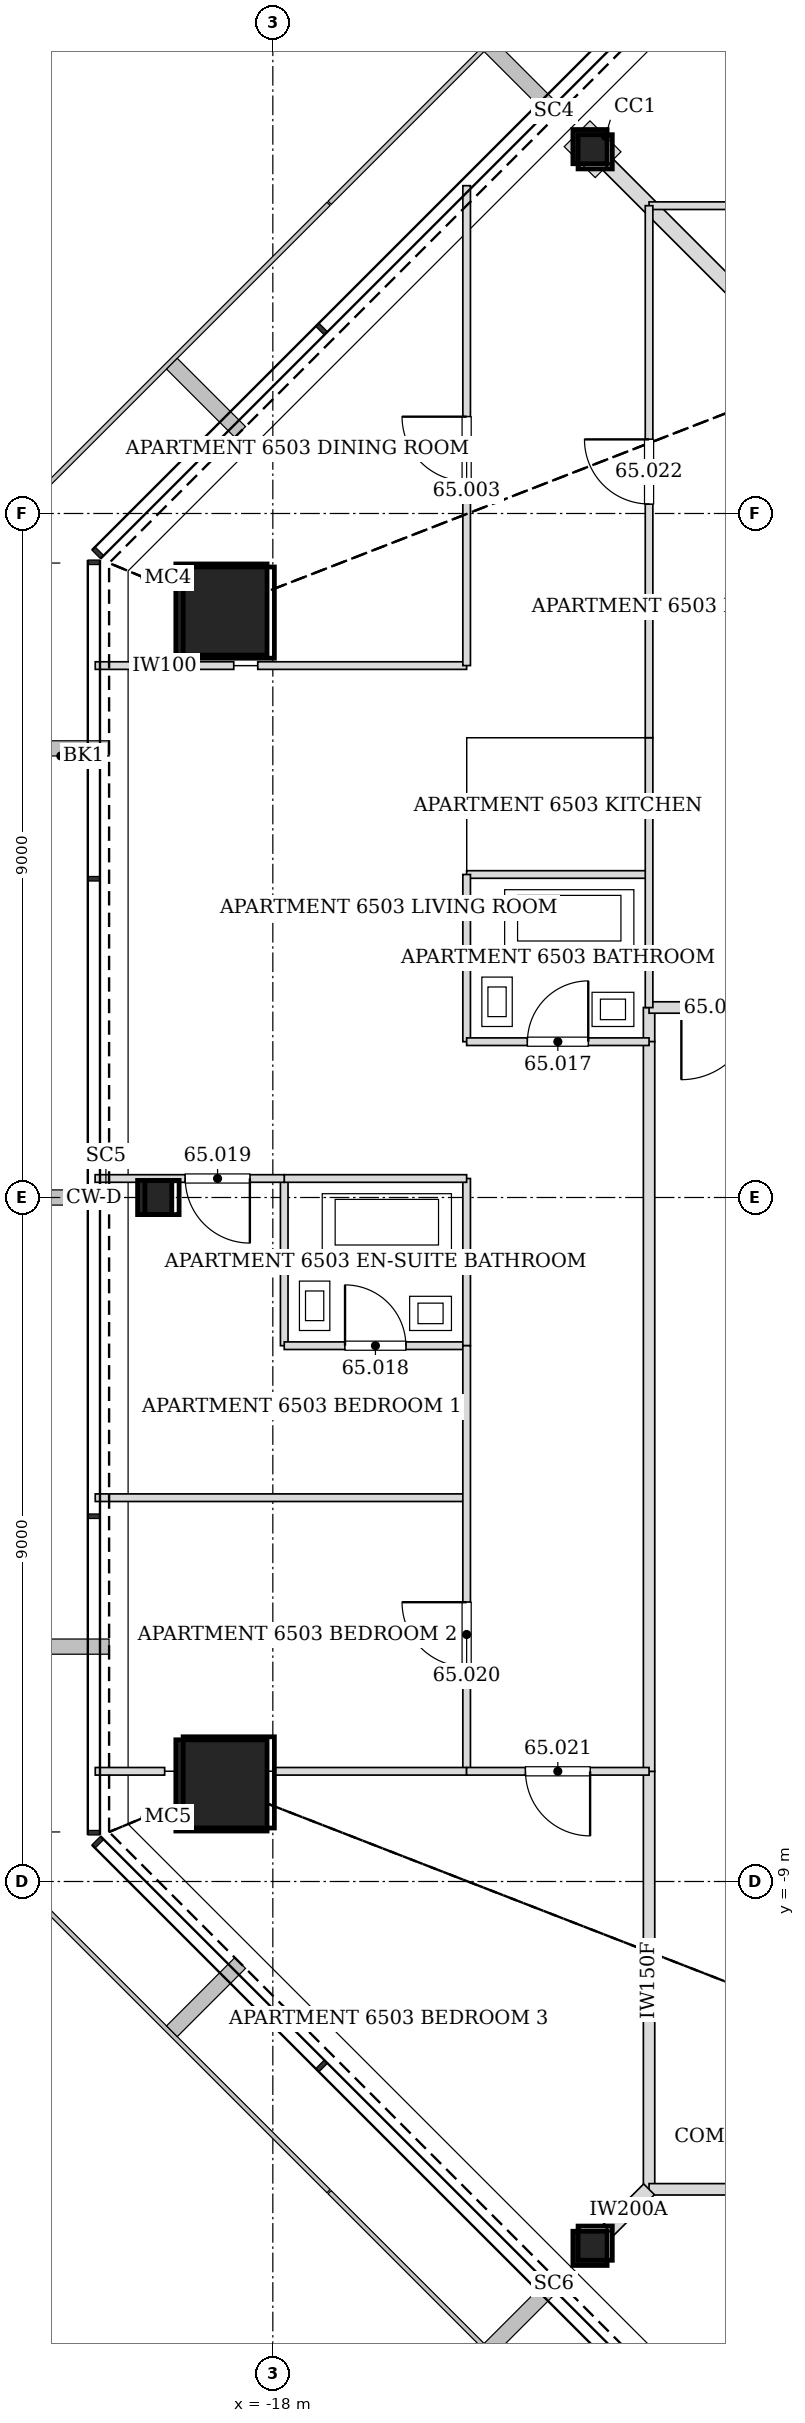
"""IFC4 building model, lengths in metres.
Left out: names, types, materials, properties, quantities, classifications, styles, units other than length and angle.
Written with IfcOpenShell. Run it as: python <this file> out.ifc"""

import sys

from ifc_helpers import new_model, si_unit, direction, frame, frame_2d, origin, origin_2d, place, context, subcontext, project, spatial, rectangle, hollow_rectangle, extrude, element, fill, save


model = new_model("IFC4")
c1 = context("Model", 3, precision=1e-05, world=origin(), true_north=direction((0.0, 1.0)))
c2 = subcontext(c1, "Body", "Model", "MODEL_VIEW")
j1 = project(units=[si_unit("LENGTHUNIT", "METRE"), si_unit("PLANEANGLEUNIT", "RADIAN")], contexts=[c1])
p1 = place(None, origin())
s1 = spatial("IfcSite", under=j1, at=p1, CompositionType="ELEMENT")
p2 = place(p1, origin())
s2 = spatial("IfcBuilding", under=s1, at=p2, CompositionType="ELEMENT")
p3 = place(p2, frame((0.0, 0.0, 270.8)))
s3 = spatial("IfcBuildingStorey", under=s2, at=p3, CompositionType="ELEMENT", Elevation=270.8)
for number, where, z_axis, x_axis in (
    (1, (-18.676, 7.736, 0.0), (0.028, -0.012, 1.0), (0.382, 0.924, 0.0)),
    (2, (-18.676, -7.736, 0.0), (0.028, 0.012, 1.0), (-0.382, 0.924, 0.0)),
):
    element("IfcColumn", number, at=place(p3, frame(where, z_axis=z_axis, x_axis=x_axis)), inside=s3, PredefinedType="COLUMN", context=c2, shape_type="SweptSolid", body=[
        extrude(hollow_rectangle(XDim=1.2, YDim=1.2, WallThickness=0.055, at=origin_2d()), origin(), (0.0, 0.0, 1.0), 3.402),
    ])
for number, where, z_axis, x_axis in (
    (3, (-13.827, 13.827, 0.0), (0.02, -0.02, 1.0), (0.707, 0.707, 0.0)),
    (4, (-19.554, 0.0, 0.0), (0.028, 0.0, 1.0), (0.0, 1.0, 0.0)),
    (5, (-13.827, -13.827, 0.0), (0.02, 0.02, 1.0), (-0.707, 0.707, 0.0)),
):
    element("IfcColumn", number, at=place(p3, frame(where, z_axis=z_axis, x_axis=x_axis)), inside=s3, PredefinedType="COLUMN", context=c2, shape_type="SweptSolid", body=[
        extrude(hollow_rectangle(XDim=0.45, YDim=0.45, WallThickness=0.02, at=origin_2d()), origin(), (0.0, 0.0, 1.0), 3.401),
    ])
p4 = place(p3, frame((-13.05, 2.5, 0.0), z_axis=(0.0, 0.0, 1.0), x_axis=(0.0, -1.0, 0.0)))
e6 = element("IfcWall", 6, at=p4, inside=s3, PredefinedType="PARTITIONING", context=c2, shape_type="SweptSolid", body=[
    extrude(rectangle(XDim=0.451, YDim=0.15, at=frame_2d((0.226, 0.0))), origin(), (0.0, 0.0, 1.0), 3.2),
])
p5 = place(p3, frame((-13.05, -7.549, 0.0), z_axis=(0.0, 0.0, 1.0), x_axis=(0.0, -1.0, 0.0)))
e7 = element("IfcWall", 7, at=p5, inside=s3, PredefinedType="PARTITIONING", context=c2, shape_type="SweptSolid", body=[
    extrude(rectangle(XDim=5.501, YDim=0.15, at=frame_2d((2.75, 0.0))), origin(), (0.0, 0.0, 1.0), 2.349),
])
p6 = place(p3, frame((-13.05, 2.051, 0.0), z_axis=(0.0, 0.0, 1.0), x_axis=(0.0, -1.0, 0.0)))
e8 = element("IfcWall", 8, at=p6, inside=s3, PredefinedType="PARTITIONING", context=c2, shape_type="SweptSolid", body=[
    extrude(rectangle(XDim=9.602, YDim=0.15, at=frame_2d((4.801, 0.0))), origin(), (0.0, 0.0, 1.0), 2.344),
])
p7 = place(p3, frame((-13.05, -13.05, 0.0), z_axis=(0.0, 0.0, 1.0), x_axis=(1.0, 0.0, 0.0)))
e9 = element("IfcWall", 9, at=p7, inside=s3, PredefinedType="PARTITIONING", context=c2, shape_type="SweptSolid", body=[
    extrude(rectangle(XDim=5.501, YDim=0.15, at=frame_2d((2.75, 0.0))), origin(), (0.0, 0.0, 1.0), 2.349),
])
p8 = place(p3, frame((-11.25, 2.5, 0.0), z_axis=(0.0, 0.0, 1.0), x_axis=(-1.0, 0.0, 0.0)))
e10 = element("IfcWall", 10, at=p8, inside=s3, PredefinedType="PARTITIONING", context=c2, shape_type="SweptSolid", body=[
    extrude(rectangle(XDim=1.8, YDim=0.15, at=frame_2d((0.9, 0.0))), origin(), (0.0, 0.0, 1.0), 3.2),
])
p9 = place(p8, frame((0.425, 0.0, 0.0)))
e11 = element("IfcOpeningElement", 11, at=p9, cuts=e10, PredefinedType="OPENING", context=c2, shape_type="SweptSolid", body=[
    extrude(rectangle(XDim=0.95, YDim=2.1, at=frame_2d((0.475, 1.05))), frame((0.0, 0.085, 0.0), z_axis=(0.0, -1.0, 0.0), x_axis=(1.0, 0.0, 0.0)), (0.0, 0.0, 1.0), 0.17),
])
p10 = place(p3, frame((-20.336, 6.999, 0.0), z_axis=(0.0, 0.0, 1.0), x_axis=(1.0, 0.0, 0.0)))
e12 = element("IfcWall", 12, at=p10, inside=s3, PredefinedType="PARTITIONING", context=c2, shape_type="SweptSolid", body=[
    extrude(rectangle(XDim=1.822, YDim=0.1, at=frame_2d((0.911, 0.0))), origin(), (0.0, 0.0, 1.0), 2.74),
])
p11 = place(p3, frame((-18.198, 6.999, 0.0), z_axis=(0.0, 0.0, 1.0), x_axis=(1.0, 0.0, 0.0)))
e13 = element("IfcWall", 13, at=p11, inside=s3, PredefinedType="PARTITIONING", context=c2, shape_type="SweptSolid", body=[
    extrude(rectangle(XDim=2.748, YDim=0.1, at=frame_2d((1.374, 0.0))), origin(), (0.0, 0.0, 1.0), 2.591),
])
p12 = place(p3, frame((-15.45, 6.999, 0.0), z_axis=(0.0, 0.0, 1.0), x_axis=(0.0, 1.0, 0.0)))
e14 = element("IfcWall", 14, at=p12, inside=s3, PredefinedType="PARTITIONING", context=c2, shape_type="SweptSolid", body=[
    extrude(rectangle(XDim=6.314, YDim=0.1, at=frame_2d((3.157, 0.0))), origin(), (0.0, 0.0, 1.0), 2.349),
])
p13 = place(p12, frame((2.425, 0.0, 0.0)))
e15 = element("IfcOpeningElement", 15, at=p13, cuts=e14, PredefinedType="OPENING", context=c2, shape_type="SweptSolid", body=[
    extrude(rectangle(XDim=0.85, YDim=2.1, at=frame_2d((0.425, 1.05))), frame((0.0, 0.06, 0.0), z_axis=(0.0, -1.0, 0.0), x_axis=(1.0, 0.0, 0.0)), (0.0, 0.0, 1.0), 0.12),
])
p14 = place(p3, frame((-13.586, 13.586, 0.0), z_axis=(0.0, 0.0, 1.0), x_axis=(0.707106781187, -0.707106781187, 0.0)))
e16 = element("IfcWall", 16, at=p14, inside=s3, PredefinedType="PARTITIONING", context=c2, shape_type="SweptSolid", body=[
    extrude(rectangle(XDim=3.277, YDim=0.2, at=frame_2d((1.638, 0.0))), origin(), (0.0, 0.0, 1.0), 2.591),
])
p15 = place(p3, frame((-13.05, 13.05, 0.0), z_axis=(0.0, 0.0, 1.0), x_axis=(1.0, 0.0, 0.0)))
e17 = element("IfcWall", 17, at=p15, inside=s3, PredefinedType="PARTITIONING", context=c2, shape_type="SweptSolid", body=[
    extrude(rectangle(XDim=7.0, YDim=0.1, at=frame_2d((3.5, 0.0))), origin(), (0.0, 0.0, 1.0), 2.349),
])
p16 = place(p15, frame((3.075, 0.0, 0.0)))
e18 = element("IfcOpeningElement", 18, at=p16, cuts=e17, PredefinedType="OPENING", context=c2, shape_type="SweptSolid", body=[
    extrude(rectangle(XDim=0.85, YDim=2.1, at=frame_2d((0.425, 1.05))), frame((0.0, 0.06, 0.0), z_axis=(0.0, -1.0, 0.0), x_axis=(1.0, 0.0, 0.0)), (0.0, 0.0, 1.0), 0.12),
])
p17 = place(p3, frame((-15.45, 4.25, 0.0), z_axis=(0.0, 0.0, 1.0), x_axis=(1.0, 0.0, 0.0)))
e19 = element("IfcWall", 19, at=p17, inside=s3, PredefinedType="PARTITIONING", context=c2, shape_type="SweptSolid", body=[
    extrude(rectangle(XDim=2.4, YDim=0.1, at=frame_2d((1.2, 0.0))), origin(), (0.0, 0.0, 1.0), 2.591),
])
p18 = place(p3, frame((-13.05, 6.05, 0.0), z_axis=(0.0, 0.0, 1.0), x_axis=(0.0, -1.0, 0.0)))
e20 = element("IfcWall", 20, at=p18, inside=s3, PredefinedType="PARTITIONING", context=c2, shape_type="SweptSolid", body=[
    extrude(rectangle(XDim=3.551, YDim=0.1, at=frame_2d((1.775, 0.0))), origin(), (0.0, 0.0, 1.0), 3.2),
])
p19 = place(p3, frame((-15.45, 4.25, 0.0), z_axis=(0.0, 0.0, 1.0), x_axis=(0.0, -1.0, 0.0)))
e21 = element("IfcWall", 21, at=p19, inside=s3, PredefinedType="PARTITIONING", context=c2, shape_type="SweptSolid", body=[
    extrude(rectangle(XDim=2.2, YDim=0.1, at=frame_2d((1.1, 0.0))), origin(), (0.0, 0.0, 1.0), 3.2),
])
p20 = place(p3, frame((-15.45, 2.05, 0.0), z_axis=(0.0, 0.0, 1.0), x_axis=(1.0, 0.0, 0.0)))
e22 = element("IfcWall", 22, at=p20, inside=s3, PredefinedType="PARTITIONING", context=c2, shape_type="SweptSolid", body=[
    extrude(rectangle(XDim=2.4, YDim=0.1, at=frame_2d((1.2, 0.0))), origin(), (0.0, 0.0, 1.0), 2.591),
])
p21 = place(p20, frame((0.8, 0.0, 0.0)))
e23 = element("IfcOpeningElement", 23, at=p21, cuts=e22, PredefinedType="OPENING", context=c2, shape_type="SweptSolid", body=[
    extrude(rectangle(XDim=0.8, YDim=2.1, at=frame_2d((0.4, 1.05))), frame((0.0, 0.06, 0.0), z_axis=(0.0, -1.0, 0.0), x_axis=(1.0, 0.0, 0.0)), (0.0, 0.0, 1.0), 0.12),
])
p22 = place(p3, frame((-17.85, 0.25, 0.0), z_axis=(0.0, 0.0, 1.0), x_axis=(0.0, -1.0, 0.0)))
e24 = element("IfcWall", 24, at=p22, inside=s3, PredefinedType="PARTITIONING", context=c2, shape_type="SweptSolid", body=[
    extrude(rectangle(XDim=2.2, YDim=0.1, at=frame_2d((1.1, 0.0))), origin(), (0.0, 0.0, 1.0), 2.344),
])
p23 = place(p3, frame((-17.85, -1.95, 0.0), z_axis=(0.0, 0.0, 1.0), x_axis=(1.0, 0.0, 0.0)))
e25 = element("IfcWall", 25, at=p23, inside=s3, PredefinedType="PARTITIONING", context=c2, shape_type="SweptSolid", body=[
    extrude(rectangle(XDim=2.4, YDim=0.1, at=frame_2d((1.2, 0.0))), origin(), (0.0, 0.0, 1.0), 2.591),
])
p24 = place(p23, frame((0.8, 0.0, 0.0)))
e26 = element("IfcOpeningElement", 26, at=p24, cuts=e25, PredefinedType="OPENING", context=c2, shape_type="SweptSolid", body=[
    extrude(rectangle(XDim=0.8, YDim=2.1, at=frame_2d((0.4, 1.05))), frame((0.0, 0.06, 0.0), z_axis=(0.0, -1.0, 0.0), x_axis=(1.0, 0.0, 0.0)), (0.0, 0.0, 1.0), 0.12),
])
p25 = place(p3, frame((-15.45, -1.95, 0.0), z_axis=(0.0, 0.0, 1.0), x_axis=(0.0, 1.0, 0.0)))
e27 = element("IfcWall", 27, at=p25, inside=s3, PredefinedType="PARTITIONING", context=c2, shape_type="SweptSolid", body=[
    extrude(rectangle(XDim=2.2, YDim=0.1, at=frame_2d((1.1, 0.0))), origin(), (0.0, 0.0, 1.0), 2.344),
])
p26 = place(p3, frame((-15.45, 0.25, 0.0), z_axis=(0.0, 0.0, 1.0), x_axis=(-1.0, 0.0, 0.0)))
e28 = element("IfcWall", 28, at=p26, inside=s3, PredefinedType="PARTITIONING", context=c2, shape_type="SweptSolid", body=[
    extrude(rectangle(XDim=2.4, YDim=0.1, at=frame_2d((1.2, 0.0))), origin(), (0.0, 0.0, 1.0), 2.591),
])
p27 = place(p3, frame((-20.336, -3.95, 0.0), z_axis=(0.0, 0.0, 1.0), x_axis=(1.0, 0.0, 0.0)))
e29 = element("IfcWall", 29, at=p27, inside=s3, PredefinedType="PARTITIONING", context=c2, shape_type="SweptSolid", body=[
    extrude(rectangle(XDim=4.886, YDim=0.1, at=frame_2d((2.443, 0.0))), origin(), (0.0, 0.0, 1.0), 2.591),
])
p28 = place(p3, frame((-17.85, 0.25, 0.0), z_axis=(0.0, 0.0, 1.0), x_axis=(-1.0, 0.0, 0.0)))
e30 = element("IfcWall", 30, at=p28, inside=s3, PredefinedType="PARTITIONING", context=c2, shape_type="SweptSolid", body=[
    extrude(rectangle(XDim=2.488, YDim=0.1, at=frame_2d((1.244, 0.0))), origin(), (0.0, 0.0, 1.0), 2.74),
])
p29 = place(p28, frame((0.452, 0.0, 0.0)))
e31 = element("IfcOpeningElement", 31, at=p29, cuts=e30, PredefinedType="OPENING", context=c2, shape_type="SweptSolid", body=[
    extrude(rectangle(XDim=0.85, YDim=2.1, at=frame_2d((0.425, 1.05))), frame((0.0, 0.06, 0.0), z_axis=(0.0, -1.0, 0.0), x_axis=(1.0, 0.0, 0.0)), (0.0, 0.0, 1.0), 0.12),
])
p30 = place(p3, frame((-15.45, -1.95, 0.0), z_axis=(0.0, 0.0, 1.0), x_axis=(0.0, -1.0, 0.0)))
e32 = element("IfcWall", 32, at=p30, inside=s3, PredefinedType="PARTITIONING", context=c2, shape_type="SweptSolid", body=[
    extrude(rectangle(XDim=5.6, YDim=0.1, at=frame_2d((2.8, 0.0))), origin(), (0.0, 0.0, 1.0), 3.2),
])
p31 = place(p30, frame((3.375, 0.0, 0.0)))
e33 = element("IfcOpeningElement", 33, at=p31, cuts=e32, PredefinedType="OPENING", context=c2, shape_type="SweptSolid", body=[
    extrude(rectangle(XDim=0.85, YDim=2.1, at=frame_2d((0.425, 1.05))), frame((0.0, 0.06, 0.0), z_axis=(0.0, -1.0, 0.0), x_axis=(1.0, 0.0, 0.0)), (0.0, 0.0, 1.0), 0.12),
])
p32 = place(p3, frame((-20.336, -7.55, 0.0), z_axis=(0.0, 0.0, 1.0), x_axis=(1.0, 0.0, 0.0)))
e34 = element("IfcWall", 34, at=p32, inside=s3, PredefinedType="PARTITIONING", context=c2, shape_type="SweptSolid", body=[
    extrude(rectangle(XDim=0.913, YDim=0.1, at=frame_2d((0.457, 0.0))), origin(), (0.0, 0.0, 1.0), 3.2),
])
p33 = place(p3, frame((-17.97, -7.55, 0.0), z_axis=(0.0, 0.0, 1.0), x_axis=(1.0, 0.0, 0.0)))
e35 = element("IfcWall", 35, at=p33, inside=s3, PredefinedType="PARTITIONING", context=c2, shape_type="SweptSolid", body=[
    extrude(rectangle(XDim=2.52, YDim=0.1, at=frame_2d((1.26, 0.0))), origin(), (0.0, 0.0, 1.0), 2.591),
])
p34 = place(p3, frame((-13.05, -7.55, 0.0), z_axis=(0.0, 0.0, 1.0), x_axis=(-1.0, 0.0, 0.0)))
e36 = element("IfcWall", 36, at=p34, inside=s3, PredefinedType="PARTITIONING", context=c2, shape_type="SweptSolid", body=[
    extrude(rectangle(XDim=2.401, YDim=0.1, at=frame_2d((1.2, 0.0))), origin(), (0.0, 0.0, 1.0), 2.591),
])
p35 = place(p34, frame((0.775, 0.0, 0.0)))
e37 = element("IfcOpeningElement", 37, at=p35, cuts=e36, PredefinedType="OPENING", context=c2, shape_type="SweptSolid", body=[
    extrude(rectangle(XDim=0.85, YDim=2.1, at=frame_2d((0.425, 1.05))), frame((0.0, 0.06, 0.0), z_axis=(0.0, -1.0, 0.0), x_axis=(1.0, 0.0, 0.0)), (0.0, 0.0, 1.0), 0.12),
])
p36 = place(p3, frame((-13.586, -13.586, 0.0), z_axis=(0.0, 0.0, 1.0), x_axis=(0.707106781187, 0.707106781187, 0.0)))
e38 = element("IfcWall", 38, at=p36, inside=s3, PredefinedType="PARTITIONING", context=c2, shape_type="SweptSolid", body=[
    extrude(rectangle(XDim=0.758, YDim=0.2, at=frame_2d((0.379, 0.0))), origin(), (0.0, 0.0, 1.0), 2.591),
])
p37 = place(p3, frame((-13.05, 6.05, 0.0), z_axis=(0.0, 0.0, 1.0), x_axis=(0.0, 1.0, 0.0)))
e39 = element("IfcWall", 39, at=p37, inside=s3, PredefinedType="PARTITIONING", context=c2, shape_type="SweptSolid", body=[
    extrude(rectangle(XDim=7.0, YDim=0.1, at=frame_2d((3.5, 0.0))), origin(), (0.0, 0.0, 1.0), 2.349),
])
p38 = place(p37, frame((3.075, 0.0, 0.0)))
e40 = element("IfcOpeningElement", 40, at=p38, cuts=e39, PredefinedType="OPENING", context=c2, shape_type="SweptSolid", body=[
    extrude(rectangle(XDim=0.85, YDim=2.1, at=frame_2d((0.425, 1.05))), frame((0.0, 0.06, 0.0), z_axis=(0.0, -1.0, 0.0), x_axis=(1.0, 0.0, 0.0)), (0.0, 0.0, 1.0), 0.12),
])
p39 = place(p13, origin())
e41 = element("IfcDoor", 41, at=p39, inside=s3, OperationType="SINGLE_SWING_RIGHT", PredefinedType="DOOR", context=c2, shape_type="SweptSolid", body=[
    extrude(rectangle(XDim=0.85, YDim=2.1, at=frame_2d((0.425, 1.05))), frame((0.0, 0.025, 0.0), z_axis=(0.0, -1.0, 0.0), x_axis=(1.0, 0.0, 0.0)), (0.0, 0.0, 1.0), 0.05),
])
fill(e15, e41)
p40 = place(p21, origin())
e42 = element("IfcDoor", 42, at=p40, inside=s3, OperationType="SINGLE_SWING_RIGHT", PredefinedType="DOOR", context=c2, shape_type="SweptSolid", body=[
    extrude(rectangle(XDim=0.8, YDim=2.1, at=frame_2d((0.4, 1.05))), frame((0.0, 0.025, 0.0), z_axis=(0.0, -1.0, 0.0), x_axis=(1.0, 0.0, 0.0)), (0.0, 0.0, 1.0), 0.05),
])
fill(e23, e42)
p41 = place(p24, origin())
e43 = element("IfcDoor", 43, at=p41, inside=s3, OperationType="SINGLE_SWING_LEFT", PredefinedType="DOOR", context=c2, shape_type="SweptSolid", body=[
    extrude(rectangle(XDim=0.8, YDim=2.1, at=frame_2d((0.4, 1.05))), frame((0.0, 0.025, 0.0), z_axis=(0.0, -1.0, 0.0), x_axis=(1.0, 0.0, 0.0)), (0.0, 0.0, 1.0), 0.05),
])
fill(e26, e43)
p42 = place(p29, origin())
e44 = element("IfcDoor", 44, at=p42, inside=s3, OperationType="SINGLE_SWING_LEFT", PredefinedType="DOOR", context=c2, shape_type="SweptSolid", body=[
    extrude(rectangle(XDim=0.85, YDim=2.1, at=frame_2d((0.425, 1.05))), frame((0.0, 0.025, 0.0), z_axis=(0.0, -1.0, 0.0), x_axis=(1.0, 0.0, 0.0)), (0.0, 0.0, 1.0), 0.05),
])
fill(e31, e44)
p43 = place(p31, frame((0.85, 0.0, 0.0), z_axis=(0.0, 0.0, 1.0), x_axis=(-1.0, 0.0, 0.0)))
e45 = element("IfcDoor", 45, at=p43, inside=s3, OperationType="SINGLE_SWING_RIGHT", PredefinedType="DOOR", context=c2, shape_type="SweptSolid", body=[
    extrude(rectangle(XDim=0.85, YDim=2.1, at=frame_2d((0.425, 1.05))), frame((0.0, 0.025, 0.0), z_axis=(0.0, -1.0, 0.0), x_axis=(1.0, 0.0, 0.0)), (0.0, 0.0, 1.0), 0.05),
])
fill(e33, e45)
p44 = place(p35, origin())
e46 = element("IfcDoor", 46, at=p44, inside=s3, OperationType="SINGLE_SWING_LEFT", PredefinedType="DOOR", context=c2, shape_type="SweptSolid", body=[
    extrude(rectangle(XDim=0.85, YDim=2.1, at=frame_2d((0.425, 1.05))), frame((0.0, 0.025, 0.0), z_axis=(0.0, -1.0, 0.0), x_axis=(1.0, 0.0, 0.0)), (0.0, 0.0, 1.0), 0.05),
])
fill(e37, e46)
p45 = place(p38, origin())
e47 = element("IfcDoor", 47, at=p45, inside=s3, OperationType="SINGLE_SWING_RIGHT", PredefinedType="DOOR", context=c2, shape_type="SweptSolid", body=[
    extrude(rectangle(XDim=0.85, YDim=2.1, at=frame_2d((0.425, 1.05))), frame((0.0, 0.025, 0.0), z_axis=(0.0, -1.0, 0.0), x_axis=(1.0, 0.0, 0.0)), (0.0, 0.0, 1.0), 0.05),
])
fill(e40, e47)
p46 = place(p9, origin())
e48 = element("IfcDoor", 48, at=p46, inside=s3, OperationType="SINGLE_SWING_RIGHT", PredefinedType="DOOR", context=c2, shape_type="SweptSolid", body=[
    extrude(rectangle(XDim=0.95, YDim=2.1, at=frame_2d((0.475, 1.05))), frame((0.0, 0.025, 0.0), z_axis=(0.0, -1.0, 0.0), x_axis=(1.0, 0.0, 0.0)), (0.0, 0.0, 1.0), 0.05),
])
fill(e11, e48)
save(model, sys.argv[1])
